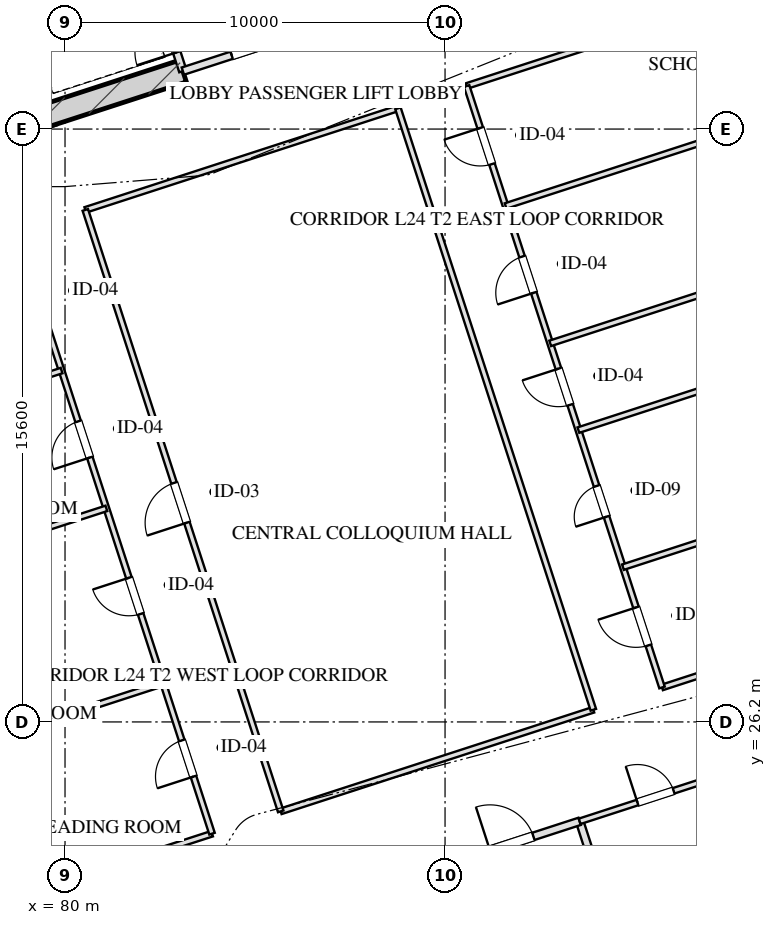
"""IFC4 building model, lengths in metres.
Left out: names, types, materials, properties, quantities, classifications, styles, units other than length and angle.
Written with IfcOpenShell. Run it as: python <this file> out.ifc"""

import sys

from ifc_helpers import new_model, si_unit, direction, frame, frame_2d, origin, place, context, subcontext, project, spatial, rectangle, extrude, element, fill, save


model = new_model("IFC4")
c1 = context("Model", 3, precision=1e-05, world=origin(), true_north=direction((0.0, 1.0)))
c2 = subcontext(c1, "Body", "Model", "MODEL_VIEW")
j1 = project(units=[si_unit("LENGTHUNIT", "METRE"), si_unit("PLANEANGLEUNIT", "RADIAN")], contexts=[c1])
p1 = place(None, origin())
s1 = spatial("IfcSite", under=j1, at=p1, CompositionType="ELEMENT")
p2 = place(p1, origin())
s2 = spatial("IfcBuilding", under=s1, at=p2, CompositionType="ELEMENT")
p3 = place(p2, frame((0.0, 0.0, 96.6)))
s3 = spatial("IfcBuildingStorey", under=s2, at=p3, CompositionType="ELEMENT", Elevation=96.6)
p4 = place(p3, frame((79.466, 41.828, 0.0), z_axis=(0.0, 0.0, 1.0), x_axis=(-0.309041232772, 0.951048640421, 0.0)))
e1 = element("IfcWall", 1, at=p4, inside=s3, PredefinedType="SHEAR", context=c2, shape_type="SweptSolid", body=[
    extrude(rectangle(XDim=9.48, YDim=0.6, at=frame_2d((4.74, 0.0))), origin(), (0.0, 0.0, 1.0), 3.45),
])
p5 = place(p3, frame((79.087, 42.021, 0.0), z_axis=(0.0, 0.0, 1.0), x_axis=(0.951062550203, 0.3089984233, 0.0)))
e2 = element("IfcWall", 2, at=p5, inside=s3, PredefinedType="SHEAR", context=c2, shape_type="SweptSolid", body=[
    extrude(rectangle(XDim=4.22, YDim=0.6, at=frame_2d((2.11, 0.0))), origin(), (0.0, 0.0, 1.0), 3.45),
])
p6 = place(p3, frame((80.716, 6.59, 0.0), z_axis=(0.0, 0.0, 1.0), x_axis=(-0.309017542002, 0.95105633836, 0.0)))
e3 = element("IfcWall", 3, at=p6, inside=s3, PredefinedType="SOLIDWALL", context=c2, shape_type="SweptSolid", body=[
    extrude(rectangle(XDim=46.4, YDim=0.4, at=frame_2d((23.2, 0.0))), origin(), (0.0, 0.0, 1.0), 2.55),
])
p7 = place(p6, frame((15.6, 0.0, 0.75)))
e4 = element("IfcOpeningElement", 4, at=p7, cuts=e3, PredefinedType="OPENING", context=c2, shape_type="SweptSolid", body=[
    extrude(rectangle(XDim=2.4, YDim=1.4, at=frame_2d((1.2, 0.7))), frame((0.0, 0.21, 0.0), z_axis=(0.0, -1.0, 0.0), x_axis=(1.0, 0.0, 0.0)), (0.0, 0.0, 1.0), 0.42),
])
p8 = place(p6, frame((19.4, 0.0, 0.75)))
e5 = element("IfcOpeningElement", 5, at=p8, cuts=e3, PredefinedType="OPENING", context=c2, shape_type="SweptSolid", body=[
    extrude(rectangle(XDim=2.4, YDim=1.4, at=frame_2d((1.2, 0.7))), frame((0.0, 0.21, 0.0), z_axis=(0.0, -1.0, 0.0), x_axis=(1.0, 0.0, 0.0)), (0.0, 0.0, 1.0), 0.42),
])
p9 = place(p6, frame((24.6, 0.0, 0.75)))
e6 = element("IfcOpeningElement", 6, at=p9, cuts=e3, PredefinedType="OPENING", context=c2, shape_type="SweptSolid", body=[
    extrude(rectangle(XDim=2.4, YDim=1.4, at=frame_2d((1.2, 0.7))), frame((0.0, 0.21, 0.0), z_axis=(0.0, -1.0, 0.0), x_axis=(1.0, 0.0, 0.0)), (0.0, 0.0, 1.0), 0.42),
])
p10 = place(p6, frame((28.4, 0.0, 0.75)))
e7 = element("IfcOpeningElement", 7, at=p10, cuts=e3, PredefinedType="OPENING", context=c2, shape_type="SweptSolid", body=[
    extrude(rectangle(XDim=2.4, YDim=1.4, at=frame_2d((1.2, 0.7))), frame((0.0, 0.21, 0.0), z_axis=(0.0, -1.0, 0.0), x_axis=(1.0, 0.0, 0.0)), (0.0, 0.0, 1.0), 0.42),
])
p11 = place(p3, frame((93.542, 23.585, 0.0), z_axis=(0.0, 0.0, 1.0), x_axis=(0.309042196757, -0.951048327176, 0.0)))
e8 = element("IfcWall", 8, at=p11, inside=s3, PredefinedType="PARTITIONING", context=c2, shape_type="SweptSolid", body=[
    extrude(rectangle(XDim=8.43, YDim=0.2, at=frame_2d((4.215, 0.0))), origin(), (0.0, 0.0, 1.0), 3.155),
])
p12 = place(p3, frame((89.899, 22.401, 0.0), z_axis=(0.0, 0.0, 1.0), x_axis=(0.951046716504, 0.309047153403, 0.0)))
e9 = element("IfcWall", 9, at=p12, inside=s3, PredefinedType="PARTITIONING", context=c2, shape_type="SweptSolid", body=[
    extrude(rectangle(XDim=3.83, YDim=0.2, at=frame_2d((1.915, 0.0))), origin(), (0.0, 0.0, 1.0), 3.155),
])
p13 = place(p12, frame((1.35, 0.0, 0.0)))
e10 = element("IfcOpeningElement", 10, at=p13, cuts=e9, PredefinedType="OPENING", context=c2, shape_type="SweptSolid", body=[
    extrude(rectangle(XDim=1.2, YDim=2.05, at=frame_2d((0.6, 1.025))), frame((0.0, 0.11, 0.0), z_axis=(0.0, -1.0, 0.0), x_axis=(1.0, 0.0, 0.0)), (0.0, 0.0, 1.0), 0.22),
])
p14 = place(p3, frame((93.542, 23.585, 0.0), z_axis=(0.0, 0.0, 1.0), x_axis=(0.951063829732, 0.308994485023, 0.0)))
e11 = element("IfcWall", 11, at=p14, inside=s3, PredefinedType="PARTITIONING", context=c2, shape_type="SweptSolid", body=[
    extrude(rectangle(XDim=4.4, YDim=0.15, at=frame_2d((2.2, 0.0))), origin(), (0.0, 0.0, 1.0), 3.155),
])
p15 = place(p14, frame((1.6, 0.0, 0.0)))
e12 = element("IfcOpeningElement", 12, at=p15, cuts=e11, PredefinedType="OPENING", context=c2, shape_type="SweptSolid", body=[
    extrude(rectangle(XDim=1.0, YDim=2.05, at=frame_2d((0.5, 1.025))), frame((0.0, 0.085, 0.0), z_axis=(0.0, -1.0, 0.0), x_axis=(1.0, 0.0, 0.0)), (0.0, 0.0, 1.0), 0.17),
])
p16 = place(p3, frame((83.101, 43.324, 0.0), z_axis=(0.0, 0.0, 1.0), x_axis=(-0.309048298632, 0.951046344356, 0.0)))
e13 = element("IfcWall", 13, at=p16, inside=s3, PredefinedType="PARTITIONING", context=c2, shape_type="SweptSolid", body=[
    extrude(rectangle(XDim=1.9, YDim=0.2, at=frame_2d((0.95, 0.0))), origin(), (0.0, 0.0, 1.0), 3.155),
])
p17 = place(p16, frame((0.52, 0.0, 0.0)))
e14 = element("IfcOpeningElement", 14, at=p17, cuts=e13, PredefinedType="OPENING", context=c2, shape_type="SweptSolid", body=[
    extrude(rectangle(XDim=1.1, YDim=2.05, at=frame_2d((0.55, 1.025))), frame((0.0, 0.11, 0.0), z_axis=(0.0, -1.0, 0.0), x_axis=(1.0, 0.0, 0.0)), (0.0, 0.0, 1.0), 0.22),
])
p18 = place(p3, frame((83.101, 43.324, 0.0), z_axis=(0.0, 0.0, 1.0), x_axis=(0.951052804469, 0.309028417967, 0.0)))
e15 = element("IfcWall", 15, at=p18, inside=s3, PredefinedType="PARTITIONING", context=c2, shape_type="SweptSolid", body=[
    extrude(rectangle(XDim=3.83, YDim=0.2, at=frame_2d((1.915, 0.0))), origin(), (0.0, 0.0, 1.0), 3.155),
])
p19 = place(p18, frame((1.35, 0.0, 0.0)))
e16 = element("IfcOpeningElement", 16, at=p19, cuts=e15, PredefinedType="OPENING", context=c2, shape_type="SweptSolid", body=[
    extrude(rectangle(XDim=1.2, YDim=2.05, at=frame_2d((0.6, 1.025))), frame((0.0, 0.11, 0.0), z_axis=(0.0, -1.0, 0.0), x_axis=(1.0, 0.0, 0.0)), (0.0, 0.0, 1.0), 0.22),
])
p20 = place(p3, frame((76.308, 20.803, 0.0), z_axis=(0.0, 0.0, 1.0), x_axis=(0.95105437725, 0.3090235776, 0.0)))
e17 = element("IfcWall", 17, at=p20, inside=s3, PredefinedType="PARTITIONING", context=c2, shape_type="SweptSolid", body=[
    extrude(rectangle(XDim=7.95, YDim=0.15, at=frame_2d((3.975, 0.0))), origin(), (0.0, 0.0, 1.0), 3.155),
])
p21 = place(p3, frame((85.676, 23.847, 0.0), z_axis=(0.0, 0.0, 1.0), x_axis=(0.951063309554, 0.308996086091, 0.0)))
e18 = element("IfcWall", 18, at=p21, inside=s3, PredefinedType="PARTITIONING", context=c2, shape_type="SweptSolid", body=[
    extrude(rectangle(XDim=8.65, YDim=0.15, at=frame_2d((4.325, 0.0))), origin(), (0.0, 0.0, 1.0), 3.155),
])
p22 = place(p3, frame((95.709, 27.107, 0.0), z_axis=(0.0, 0.0, 1.0), x_axis=(0.951056688031, 0.309016465825, 0.0)))
e19 = element("IfcWall", 19, at=p22, inside=s3, PredefinedType="PARTITIONING", context=c2, shape_type="SweptSolid", body=[
    extrude(rectangle(XDim=13.8, YDim=0.15, at=frame_2d((6.9, 0.0))), origin(), (0.0, 0.0, 1.0), 3.155),
])
p23 = place(p3, frame((80.534, 39.672, 0.0), z_axis=(0.0, 0.0, 1.0), x_axis=(0.951052319652, 0.309029910015, 0.0)))
e20 = element("IfcWall", 20, at=p23, inside=s3, PredefinedType="PARTITIONING", context=c2, shape_type="SweptSolid", body=[
    extrude(rectangle(XDim=8.65, YDim=0.15, at=frame_2d((4.325, 0.0))), origin(), (0.0, 0.0, 1.0), 3.155),
])
p24 = place(p3, frame((90.567, 42.933, 0.0), z_axis=(0.0, 0.0, 1.0), x_axis=(0.951058377365, 0.309011266531, 0.0)))
e21 = element("IfcWall", 21, at=p24, inside=s3, PredefinedType="PARTITIONING", context=c2, shape_type="SweptSolid", body=[
    extrude(rectangle(XDim=13.8, YDim=0.15, at=frame_2d((6.9, 0.0))), origin(), (0.0, 0.0, 1.0), 3.155),
])
p25 = place(p3, frame((83.869, 23.26, 0.0), z_axis=(0.0, 0.0, 1.0), x_axis=(-0.309022042254, 0.951054876125, 0.0)))
e22 = element("IfcWall", 22, at=p25, inside=s3, PredefinedType="PARTITIONING", context=c2, shape_type="SweptSolid", body=[
    extrude(rectangle(XDim=16.64, YDim=0.15, at=frame_2d((8.32, 0.0))), origin(), (0.0, 0.0, 1.0), 3.155),
])
p26 = place(p25, frame((1.58, 0.0, 0.0)))
e23 = element("IfcOpeningElement", 23, at=p26, cuts=e22, PredefinedType="OPENING", context=c2, shape_type="SweptSolid", body=[
    extrude(rectangle(XDim=1.0, YDim=2.05, at=frame_2d((0.5, 1.025))), frame((0.0, 0.085, 0.0), z_axis=(0.0, -1.0, 0.0), x_axis=(1.0, 0.0, 0.0)), (0.0, 0.0, 1.0), 0.17),
])
p27 = place(p25, frame((6.08, 0.0, 0.0)))
e24 = element("IfcOpeningElement", 24, at=p27, cuts=e22, PredefinedType="OPENING", context=c2, shape_type="SweptSolid", body=[
    extrude(rectangle(XDim=1.0, YDim=2.05, at=frame_2d((0.5, 1.025))), frame((0.0, 0.085, 0.0), z_axis=(0.0, -1.0, 0.0), x_axis=(1.0, 0.0, 0.0)), (0.0, 0.0, 1.0), 0.17),
])
p28 = place(p25, frame((10.406, 0.0, 0.0)))
e25 = element("IfcOpeningElement", 25, at=p28, cuts=e22, PredefinedType="OPENING", context=c2, shape_type="SweptSolid", body=[
    extrude(rectangle(XDim=1.0, YDim=2.05, at=frame_2d((0.5, 1.025))), frame((0.0, 0.085, 0.0), z_axis=(0.0, -1.0, 0.0), x_axis=(1.0, 0.0, 0.0)), (0.0, 0.0, 1.0), 0.17),
])
p29 = place(p25, frame((14.226, 0.0, 0.0)))
e26 = element("IfcOpeningElement", 26, at=p29, cuts=e22, PredefinedType="OPENING", context=c2, shape_type="SweptSolid", body=[
    extrude(rectangle(XDim=1.0, YDim=2.05, at=frame_2d((0.5, 1.025))), frame((0.0, 0.085, 0.0), z_axis=(0.0, -1.0, 0.0), x_axis=(1.0, 0.0, 0.0)), (0.0, 0.0, 1.0), 0.17),
])
p30 = place(p3, frame((85.676, 23.847, 0.0), z_axis=(0.0, 0.0, 1.0), x_axis=(-0.309008771245, 0.951059188113, 0.0)))
e27 = element("IfcWall", 27, at=p30, inside=s3, PredefinedType="PARTITIONING", context=c2, shape_type="SweptSolid", body=[
    extrude(rectangle(XDim=16.64, YDim=0.15, at=frame_2d((8.32, 0.0))), origin(), (0.0, 0.0, 1.0), 3.155),
])
p31 = place(p30, frame((7.987, 0.0, 0.0)))
e28 = element("IfcOpeningElement", 28, at=p31, cuts=e27, PredefinedType="OPENING", context=c2, shape_type="SweptSolid", body=[
    extrude(rectangle(XDim=1.1, YDim=2.05, at=frame_2d((0.55, 1.025))), frame((0.0, 0.085, 0.0), z_axis=(0.0, -1.0, 0.0), x_axis=(1.0, 0.0, 0.0)), (0.0, 0.0, 1.0), 0.17),
])
p32 = place(p3, frame((93.903, 26.52, 0.0), z_axis=(0.0, 0.0, 1.0), x_axis=(-0.30901773025, 0.951056277195, 0.0)))
e29 = element("IfcWall", 29, at=p32, inside=s3, PredefinedType="PARTITIONING", context=c2, shape_type="SweptSolid", body=[
    extrude(rectangle(XDim=16.64, YDim=0.15, at=frame_2d((8.32, 0.0))), origin(), (0.0, 0.0, 1.0), 3.155),
])
p33 = place(p3, frame((95.709, 27.107, 0.0), z_axis=(0.0, 0.0, 1.0), x_axis=(-0.30901773025, 0.951056277195, 0.0)))
e30 = element("IfcWall", 30, at=p33, inside=s3, PredefinedType="PARTITIONING", context=c2, shape_type="SweptSolid", body=[
    extrude(rectangle(XDim=16.64, YDim=0.15, at=frame_2d((8.32, 0.0))), origin(), (0.0, 0.0, 1.0), 3.155),
])
p34 = place(p33, frame((1.164, 0.0, 0.0)))
e31 = element("IfcOpeningElement", 31, at=p34, cuts=e30, PredefinedType="OPENING", context=c2, shape_type="SweptSolid", body=[
    extrude(rectangle(XDim=1.05, YDim=2.05, at=frame_2d((0.525, 1.025))), frame((0.0, 0.085, 0.0), z_axis=(0.0, -1.0, 0.0), x_axis=(1.0, 0.0, 0.0)), (0.0, 0.0, 1.0), 0.17),
])
p35 = place(p33, frame((4.724, 0.0, 0.0)))
e32 = element("IfcOpeningElement", 32, at=p35, cuts=e30, PredefinedType="OPENING", context=c2, shape_type="SweptSolid", body=[
    extrude(rectangle(XDim=0.85, YDim=2.05, at=frame_2d((0.425, 1.025))), frame((0.0, 0.085, 0.0), z_axis=(0.0, -1.0, 0.0), x_axis=(1.0, 0.0, 0.0)), (0.0, 0.0, 1.0), 0.17),
])
p36 = place(p33, frame((7.82, 0.0, 0.0)))
e33 = element("IfcOpeningElement", 33, at=p36, cuts=e30, PredefinedType="OPENING", context=c2, shape_type="SweptSolid", body=[
    extrude(rectangle(XDim=1.0, YDim=2.05, at=frame_2d((0.5, 1.025))), frame((0.0, 0.085, 0.0), z_axis=(0.0, -1.0, 0.0), x_axis=(1.0, 0.0, 0.0)), (0.0, 0.0, 1.0), 0.17),
])
p37 = place(p33, frame((10.92, 0.0, 0.0)))
e34 = element("IfcOpeningElement", 34, at=p37, cuts=e30, PredefinedType="OPENING", context=c2, shape_type="SweptSolid", body=[
    extrude(rectangle(XDim=1.0, YDim=2.05, at=frame_2d((0.5, 1.025))), frame((0.0, 0.085, 0.0), z_axis=(0.0, -1.0, 0.0), x_axis=(1.0, 0.0, 0.0)), (0.0, 0.0, 1.0), 0.17),
])
p38 = place(p33, frame((14.48, 0.0, 0.0)))
e35 = element("IfcOpeningElement", 35, at=p38, cuts=e30, PredefinedType="OPENING", context=c2, shape_type="SweptSolid", body=[
    extrude(rectangle(XDim=1.0, YDim=2.05, at=frame_2d((0.5, 1.025))), frame((0.0, 0.085, 0.0), z_axis=(0.0, -1.0, 0.0), x_axis=(1.0, 0.0, 0.0)), (0.0, 0.0, 1.0), 0.17),
])
for number, where, z_axis, x_axis in (
    (36, (75.022, 24.76, 0.0), (0.0, 0.0, 1.0), (0.951, 0.309, 0.0)),
    (37, (73.527, 29.363, 0.0), (0.0, 0.0, 1.0), (0.951, 0.309, 0.0)),
    (38, (72.349, 32.989, 0.0), (0.0, 0.0, 1.0), (0.951, 0.309, 0.0)),
):
    element("IfcWall", number, at=place(p3, frame(where, z_axis=z_axis, x_axis=x_axis)), inside=s3, PredefinedType="PARTITIONING", context=c2, shape_type="SweptSolid", body=[
        extrude(rectangle(XDim=7.95, YDim=0.15, at=frame_2d((3.975, 0.0))), origin(), (0.0, 0.0, 1.0), 3.155),
    ])
p39 = place(p3, frame((94.681, 30.272, 0.0), z_axis=(0.0, 0.0, 1.0), x_axis=(0.951051488548, 0.309032467762, 0.0)))
e39 = element("IfcWall", 39, at=p39, inside=s3, PredefinedType="PARTITIONING", context=c2, shape_type="SweptSolid", body=[
    extrude(rectangle(XDim=13.8, YDim=0.15, at=frame_2d((6.9, 0.0))), origin(), (0.0, 0.0, 1.0), 3.155),
])
p40 = place(p3, frame((93.509, 33.878, 0.0), z_axis=(0.0, 0.0, 1.0), x_axis=(0.951056688031, 0.309016465825, 0.0)))
e40 = element("IfcWall", 40, at=p40, inside=s3, PredefinedType="PARTITIONING", context=c2, shape_type="SweptSolid", body=[
    extrude(rectangle(XDim=13.8, YDim=0.15, at=frame_2d((6.9, 0.0))), origin(), (0.0, 0.0, 1.0), 3.155),
])
p41 = place(p3, frame((92.768, 36.161, 0.0), z_axis=(0.0, 0.0, 1.0), x_axis=(0.951058377365, 0.309011266531, 0.0)))
e41 = element("IfcWall", 41, at=p41, inside=s3, PredefinedType="PARTITIONING", context=c2, shape_type="SweptSolid", body=[
    extrude(rectangle(XDim=13.8, YDim=0.15, at=frame_2d((6.9, 0.0))), origin(), (0.0, 0.0, 1.0), 3.155),
])
p42 = place(p3, frame((91.594, 39.775, 0.0), z_axis=(0.0, 0.0, 1.0), x_axis=(0.951056688031, 0.309016465825, 0.0)))
e42 = element("IfcWall", 42, at=p42, inside=s3, PredefinedType="PARTITIONING", context=c2, shape_type="SweptSolid", body=[
    extrude(rectangle(XDim=13.8, YDim=0.15, at=frame_2d((6.9, 0.0))), origin(), (0.0, 0.0, 1.0), 3.155),
])
p43 = place(p13, origin())
e43 = element("IfcDoor", 43, at=p43, inside=s3, OperationType="SINGLE_SWING_LEFT", PredefinedType="DOOR", context=c2, shape_type="SweptSolid", body=[
    extrude(rectangle(XDim=1.2, YDim=2.05, at=frame_2d((0.6, 1.025))), frame((0.0, 0.025, 0.0), z_axis=(0.0, -1.0, 0.0), x_axis=(1.0, 0.0, 0.0)), (0.0, 0.0, 1.0), 0.05),
])
fill(e10, e43)
p44 = place(p15, origin())
e44 = element("IfcDoor", 44, at=p44, inside=s3, OperationType="SINGLE_SWING_LEFT", PredefinedType="DOOR", context=c2, shape_type="SweptSolid", body=[
    extrude(rectangle(XDim=1.0, YDim=2.05, at=frame_2d((0.5, 1.025))), frame((0.0, 0.025, 0.0), z_axis=(0.0, -1.0, 0.0), x_axis=(1.0, 0.0, 0.0)), (0.0, 0.0, 1.0), 0.05),
])
fill(e12, e44)
p45 = place(p17, origin())
e45 = element("IfcDoor", 45, at=p45, inside=s3, OperationType="SINGLE_SWING_LEFT", PredefinedType="DOOR", context=c2, shape_type="SweptSolid", body=[
    extrude(rectangle(XDim=1.1, YDim=2.05, at=frame_2d((0.55, 1.025))), frame((0.0, 0.025, 0.0), z_axis=(0.0, -1.0, 0.0), x_axis=(1.0, 0.0, 0.0)), (0.0, 0.0, 1.0), 0.05),
])
fill(e14, e45)
p46 = place(p19, origin())
e46 = element("IfcDoor", 46, at=p46, inside=s3, OperationType="SINGLE_SWING_LEFT", PredefinedType="DOOR", context=c2, shape_type="SweptSolid", body=[
    extrude(rectangle(XDim=1.2, YDim=2.05, at=frame_2d((0.6, 1.025))), frame((0.0, 0.025, 0.0), z_axis=(0.0, -1.0, 0.0), x_axis=(1.0, 0.0, 0.0)), (0.0, 0.0, 1.0), 0.05),
])
fill(e16, e46)
p47 = place(p26, origin())
e47 = element("IfcDoor", 47, at=p47, inside=s3, OperationType="SINGLE_SWING_LEFT", PredefinedType="DOOR", context=c2, shape_type="SweptSolid", body=[
    extrude(rectangle(XDim=1.0, YDim=2.05, at=frame_2d((0.5, 1.025))), frame((0.0, 0.025, 0.0), z_axis=(0.0, -1.0, 0.0), x_axis=(1.0, 0.0, 0.0)), (0.0, 0.0, 1.0), 0.05),
])
fill(e23, e47)
p48 = place(p27, origin())
e48 = element("IfcDoor", 48, at=p48, inside=s3, OperationType="SINGLE_SWING_RIGHT", PredefinedType="DOOR", context=c2, shape_type="SweptSolid", body=[
    extrude(rectangle(XDim=1.0, YDim=2.05, at=frame_2d((0.5, 1.025))), frame((0.0, 0.025, 0.0), z_axis=(0.0, -1.0, 0.0), x_axis=(1.0, 0.0, 0.0)), (0.0, 0.0, 1.0), 0.05),
])
fill(e24, e48)
p49 = place(p28, origin())
e49 = element("IfcDoor", 49, at=p49, inside=s3, OperationType="SINGLE_SWING_LEFT", PredefinedType="DOOR", context=c2, shape_type="SweptSolid", body=[
    extrude(rectangle(XDim=1.0, YDim=2.05, at=frame_2d((0.5, 1.025))), frame((0.0, 0.025, 0.0), z_axis=(0.0, -1.0, 0.0), x_axis=(1.0, 0.0, 0.0)), (0.0, 0.0, 1.0), 0.05),
])
fill(e25, e49)
p50 = place(p31, origin())
e50 = element("IfcDoor", 50, at=p50, inside=s3, OperationType="SINGLE_SWING_LEFT", PredefinedType="DOOR", context=c2, shape_type="SweptSolid", body=[
    extrude(rectangle(XDim=1.1, YDim=2.05, at=frame_2d((0.55, 1.025))), frame((0.0, 0.025, 0.0), z_axis=(0.0, -1.0, 0.0), x_axis=(1.0, 0.0, 0.0)), (0.0, 0.0, 1.0), 0.05),
])
fill(e28, e50)
p51 = place(p34, origin())
e51 = element("IfcDoor", 51, at=p51, inside=s3, OperationType="SINGLE_SWING_RIGHT", PredefinedType="DOOR", context=c2, shape_type="SweptSolid", body=[
    extrude(rectangle(XDim=1.05, YDim=2.05, at=frame_2d((0.525, 1.025))), frame((0.0, 0.025, 0.0), z_axis=(0.0, -1.0, 0.0), x_axis=(1.0, 0.0, 0.0)), (0.0, 0.0, 1.0), 0.05),
])
fill(e31, e51)
p52 = place(p35, origin())
e52 = element("IfcDoor", 52, at=p52, inside=s3, OperationType="SINGLE_SWING_LEFT", PredefinedType="DOOR", context=c2, shape_type="SweptSolid", body=[
    extrude(rectangle(XDim=0.85, YDim=2.05, at=frame_2d((0.425, 1.025))), frame((0.0, 0.025, 0.0), z_axis=(0.0, -1.0, 0.0), x_axis=(1.0, 0.0, 0.0)), (0.0, 0.0, 1.0), 0.05),
])
fill(e32, e52)
p53 = place(p36, origin())
e53 = element("IfcDoor", 53, at=p53, inside=s3, OperationType="SINGLE_SWING_RIGHT", PredefinedType="DOOR", context=c2, shape_type="SweptSolid", body=[
    extrude(rectangle(XDim=1.0, YDim=2.05, at=frame_2d((0.5, 1.025))), frame((0.0, 0.025, 0.0), z_axis=(0.0, -1.0, 0.0), x_axis=(1.0, 0.0, 0.0)), (0.0, 0.0, 1.0), 0.05),
])
fill(e33, e53)
p54 = place(p37, origin())
e54 = element("IfcDoor", 54, at=p54, inside=s3, OperationType="SINGLE_SWING_LEFT", PredefinedType="DOOR", context=c2, shape_type="SweptSolid", body=[
    extrude(rectangle(XDim=1.0, YDim=2.05, at=frame_2d((0.5, 1.025))), frame((0.0, 0.025, 0.0), z_axis=(0.0, -1.0, 0.0), x_axis=(1.0, 0.0, 0.0)), (0.0, 0.0, 1.0), 0.05),
])
fill(e34, e54)
p55 = place(p38, origin())
e55 = element("IfcDoor", 55, at=p55, inside=s3, OperationType="SINGLE_SWING_RIGHT", PredefinedType="DOOR", context=c2, shape_type="SweptSolid", body=[
    extrude(rectangle(XDim=1.0, YDim=2.05, at=frame_2d((0.5, 1.025))), frame((0.0, 0.025, 0.0), z_axis=(0.0, -1.0, 0.0), x_axis=(1.0, 0.0, 0.0)), (0.0, 0.0, 1.0), 0.05),
])
fill(e35, e55)
save(model, sys.argv[1])
